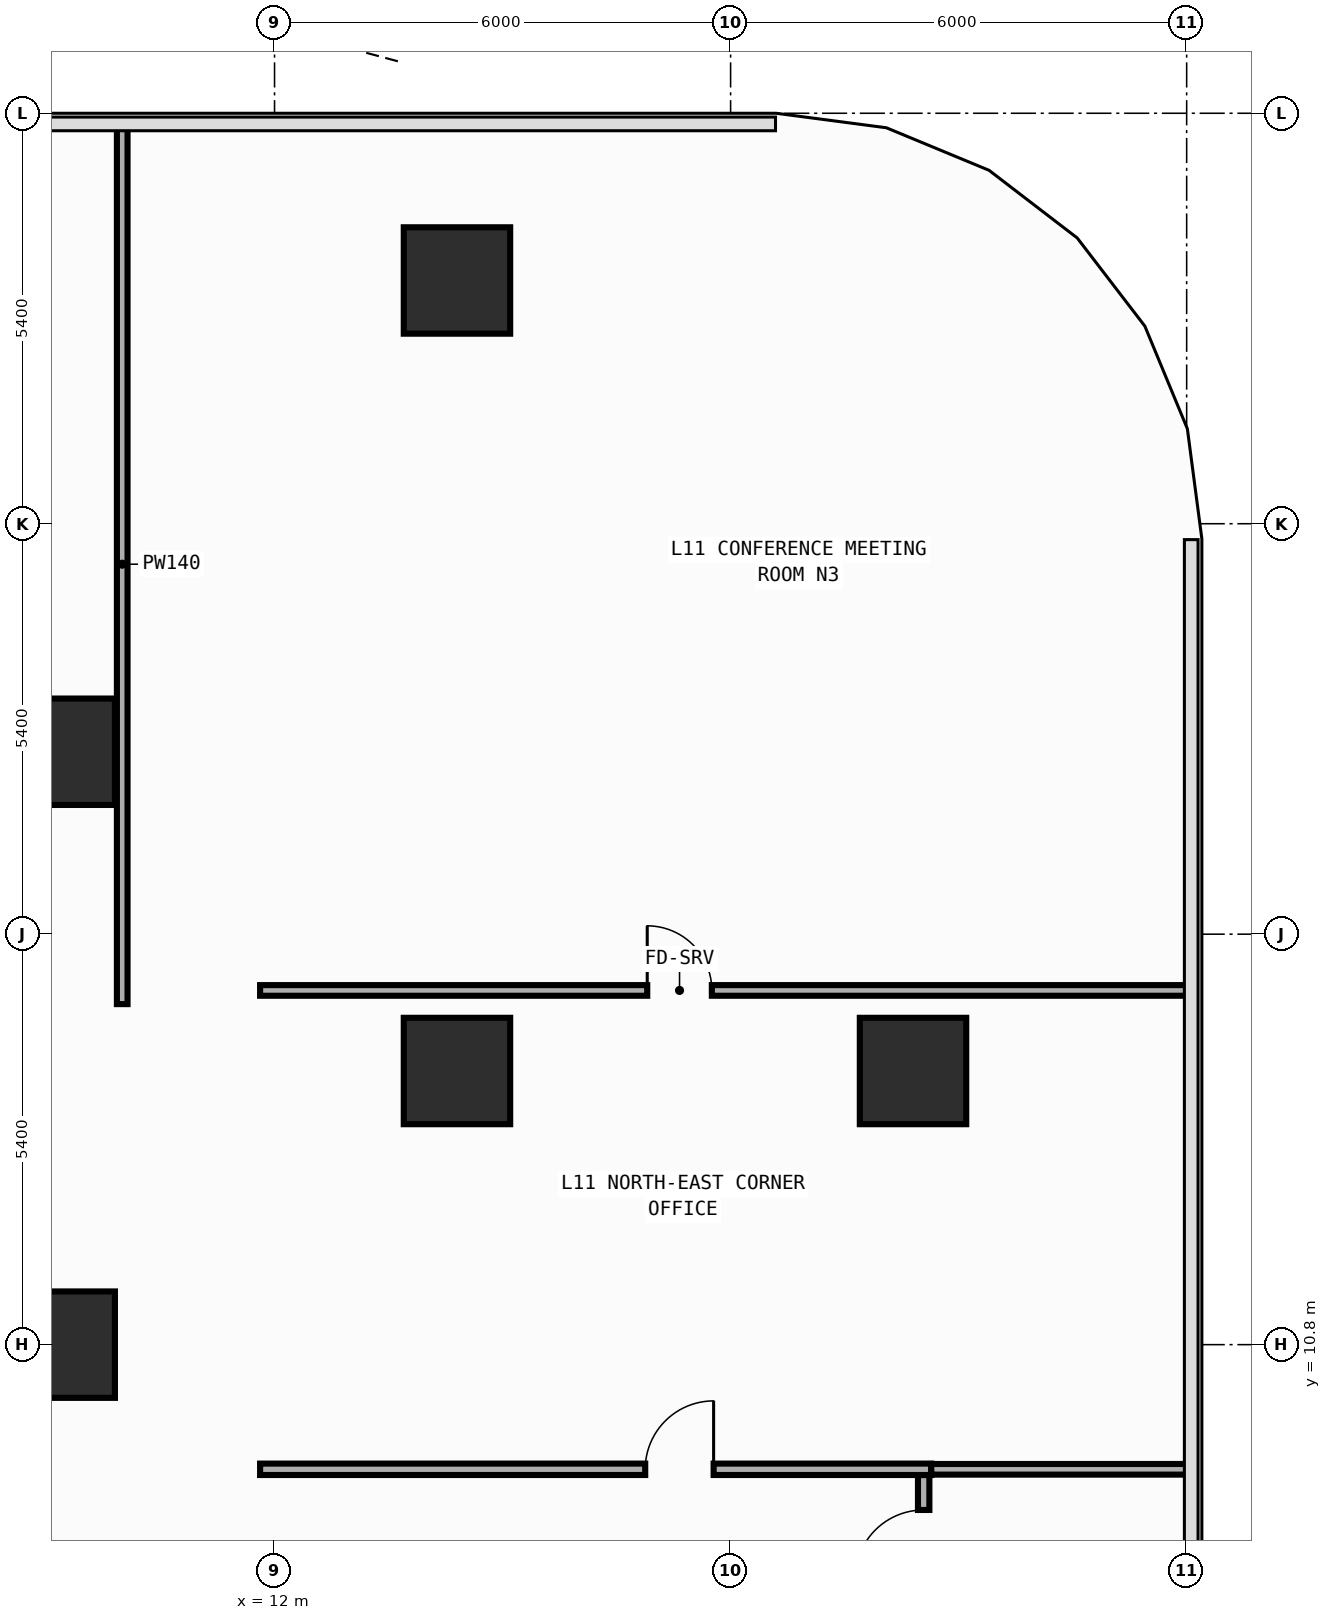
"""IFC4 building model, lengths in metres.
Left out: names, types, materials, properties, quantities, classifications, styles, units other than length and angle.
Written with IfcOpenShell. Run it as: python <this file> out.ifc"""

import sys

from ifc_helpers import new_model, si_unit, direction, frame, frame_2d, origin, origin_2d, place, context, subcontext, project, spatial, rectangle, extrude, element, fill, save


model = new_model("IFC4")
c1 = context("Model", 3, precision=1e-05, world=origin(), true_north=direction((0.0, 1.0)))
c2 = subcontext(c1, "Body", "Model", "MODEL_VIEW")
j1 = project(units=[si_unit("LENGTHUNIT", "METRE"), si_unit("PLANEANGLEUNIT", "RADIAN")], contexts=[c1])
p1 = place(None, origin())
s1 = spatial("IfcSite", under=j1, at=p1, CompositionType="ELEMENT")
p2 = place(p1, origin())
s2 = spatial("IfcBuilding", under=s1, at=p2, CompositionType="ELEMENT")
p3 = place(p2, frame((0.0, 0.0, 47.0)))
s3 = spatial("IfcBuildingStorey", under=s2, at=p3, CompositionType="ELEMENT", Elevation=47.0)
for number, where, z_axis, x_axis in (
    (1, (9.2, 10.8, 0.0), (0.0, 0.0, 1.0), (1.0, 0.0, 0.0)),
    (2, (9.2, 18.6, 0.0), (0.0, 0.0, 1.0), (1.0, 0.0, 0.0)),
    (3, (20.4, 14.4, 0.0), (0.0, 0.0, 1.0), (1.0, 0.0, 0.0)),
    (4, (14.4, 14.4, 0.0), (0.0, 0.0, 1.0), (1.0, 0.0, 0.0)),
    (5, (14.4, 24.8, 0.0), (0.0, 0.0, 1.0), (1.0, 0.0, 0.0)),
):
    element("IfcColumn", number, at=place(p3, frame(where, z_axis=z_axis, x_axis=x_axis)), inside=s3, PredefinedType="COLUMN", context=c2, shape_type="SweptSolid", body=[
        extrude(rectangle(XDim=1.4, YDim=1.4, at=origin_2d()), origin(), (0.0, 0.0, 1.0), 4.2),
    ])
p4 = place(p3, frame((20.54, 7.06, 0.0), z_axis=(0.0, 0.0, 1.0), x_axis=(0.0, 1.0, 0.0)))
e6 = element("IfcWall", 6, at=p4, inside=s3, PredefinedType="PARTITIONING", context=c2, shape_type="SweptSolid", body=[
    extrude(rectangle(XDim=2.025, YDim=0.15, at=frame_2d((1.012, 0.0))), origin(), (0.0, 0.0, 1.0), 3.94),
])
p5 = place(p4, frame((0.665, 0.0, 0.0)))
e7 = element("IfcOpeningElement", 7, at=p5, cuts=e6, PredefinedType="OPENING", context=c2, shape_type="SweptSolid", body=[
    extrude(rectangle(XDim=0.9, YDim=2.15, at=frame_2d((0.45, 1.075))), frame((0.0, 0.085, 0.0), z_axis=(0.0, -1.0, 0.0), x_axis=(1.0, 0.0, 0.0)), (0.0, 0.0, 1.0), 0.17),
])
p6 = place(p3, frame((11.81, 9.16, 0.0), z_axis=(0.0, 0.0, 1.0), x_axis=(1.0, 0.0, 0.0)))
e8 = element("IfcWall", 8, at=p6, inside=s3, PredefinedType="PARTITIONING", context=c2, shape_type="SweptSolid", body=[
    extrude(rectangle(XDim=8.83, YDim=0.15, at=frame_2d((4.415, 0.0))), origin(), (0.0, 0.0, 1.0), 3.94),
])
p7 = place(p6, frame((5.067, 0.0, 0.0)))
e9 = element("IfcOpeningElement", 9, at=p7, cuts=e8, PredefinedType="OPENING", context=c2, shape_type="SweptSolid", body=[
    extrude(rectangle(XDim=0.9, YDim=2.15, at=frame_2d((0.45, 1.075))), frame((0.0, 0.085, 0.0), z_axis=(0.0, -1.0, 0.0), x_axis=(1.0, 0.0, 0.0)), (0.0, 0.0, 1.0), 0.17),
])
p8 = place(p3, frame((20.64, 9.16, 0.0), z_axis=(0.0, 0.0, 1.0), x_axis=(1.0, 0.0, 0.0)))
e10 = element("IfcWall", 10, at=p8, inside=s3, PredefinedType="PARTITIONING", context=c2, shape_type="SweptSolid", body=[
    extrude(rectangle(XDim=3.415, YDim=0.14, at=frame_2d((1.708, 0.0))), origin(), (0.0, 0.0, 1.0), 3.94),
])
p9 = place(p3, frame((11.81, 15.46, 0.0), z_axis=(0.0, 0.0, 1.0), x_axis=(1.0, 0.0, 0.0)))
e11 = element("IfcWall", 11, at=p9, inside=s3, PredefinedType="PARTITIONING", context=c2, shape_type="SweptSolid", body=[
    extrude(rectangle(XDim=12.245, YDim=0.14, at=frame_2d((6.123, 0.0))), origin(), (0.0, 0.0, 1.0), 3.94),
])
p10 = place(p9, frame((5.093, 0.0, 0.0)))
e12 = element("IfcOpeningElement", 12, at=p10, cuts=e11, PredefinedType="OPENING", context=c2, shape_type="SweptSolid", body=[
    extrude(rectangle(XDim=0.85, YDim=2.1, at=frame_2d((0.425, 1.05))), frame((0.0, 0.08, 0.0), z_axis=(0.0, -1.0, 0.0), x_axis=(1.0, 0.0, 0.0)), (0.0, 0.0, 1.0), 0.16),
])
p11 = place(p3, frame((9.996, 15.28, 0.0), z_axis=(0.0, 0.0, 1.0), x_axis=(0.0, 1.0, 0.0)))
e13 = element("IfcWall", 13, at=p11, inside=s3, PredefinedType="PARTITIONING", context=c2, shape_type="SweptSolid", body=[
    extrude(rectangle(XDim=11.575, YDim=0.14, at=frame_2d((5.788, 0.0))), origin(), (0.0, 0.0, 1.0), 3.94),
])
p12 = place(p5, origin())
e14 = element("IfcDoor", 14, at=p12, inside=s3, OperationType="SINGLE_SWING_LEFT", PredefinedType="DOOR", context=c2, shape_type="SweptSolid", body=[
    extrude(rectangle(XDim=0.9, YDim=2.15, at=frame_2d((0.45, 1.075))), frame((0.0, 0.025, 0.0), z_axis=(0.0, -1.0, 0.0), x_axis=(1.0, 0.0, 0.0)), (0.0, 0.0, 1.0), 0.05),
])
fill(e7, e14)
p13 = place(p7, origin())
e15 = element("IfcDoor", 15, at=p13, inside=s3, OperationType="SINGLE_SWING_RIGHT", PredefinedType="DOOR", context=c2, shape_type="SweptSolid", body=[
    extrude(rectangle(XDim=0.9, YDim=2.15, at=frame_2d((0.45, 1.075))), frame((0.0, 0.025, 0.0), z_axis=(0.0, -1.0, 0.0), x_axis=(1.0, 0.0, 0.0)), (0.0, 0.0, 1.0), 0.05),
])
fill(e9, e15)
p14 = place(p10, origin())
e16 = element("IfcDoor", 16, at=p14, inside=s3, OperationType="SINGLE_SWING_LEFT", PredefinedType="DOOR", context=c2, shape_type="SweptSolid", body=[
    extrude(rectangle(XDim=0.85, YDim=2.1, at=frame_2d((0.425, 1.05))), frame((0.0, 0.025, 0.0), z_axis=(0.0, -1.0, 0.0), x_axis=(1.0, 0.0, 0.0)), (0.0, 0.0, 1.0), 0.05),
])
fill(e12, e16)
save(model, sys.argv[1])
